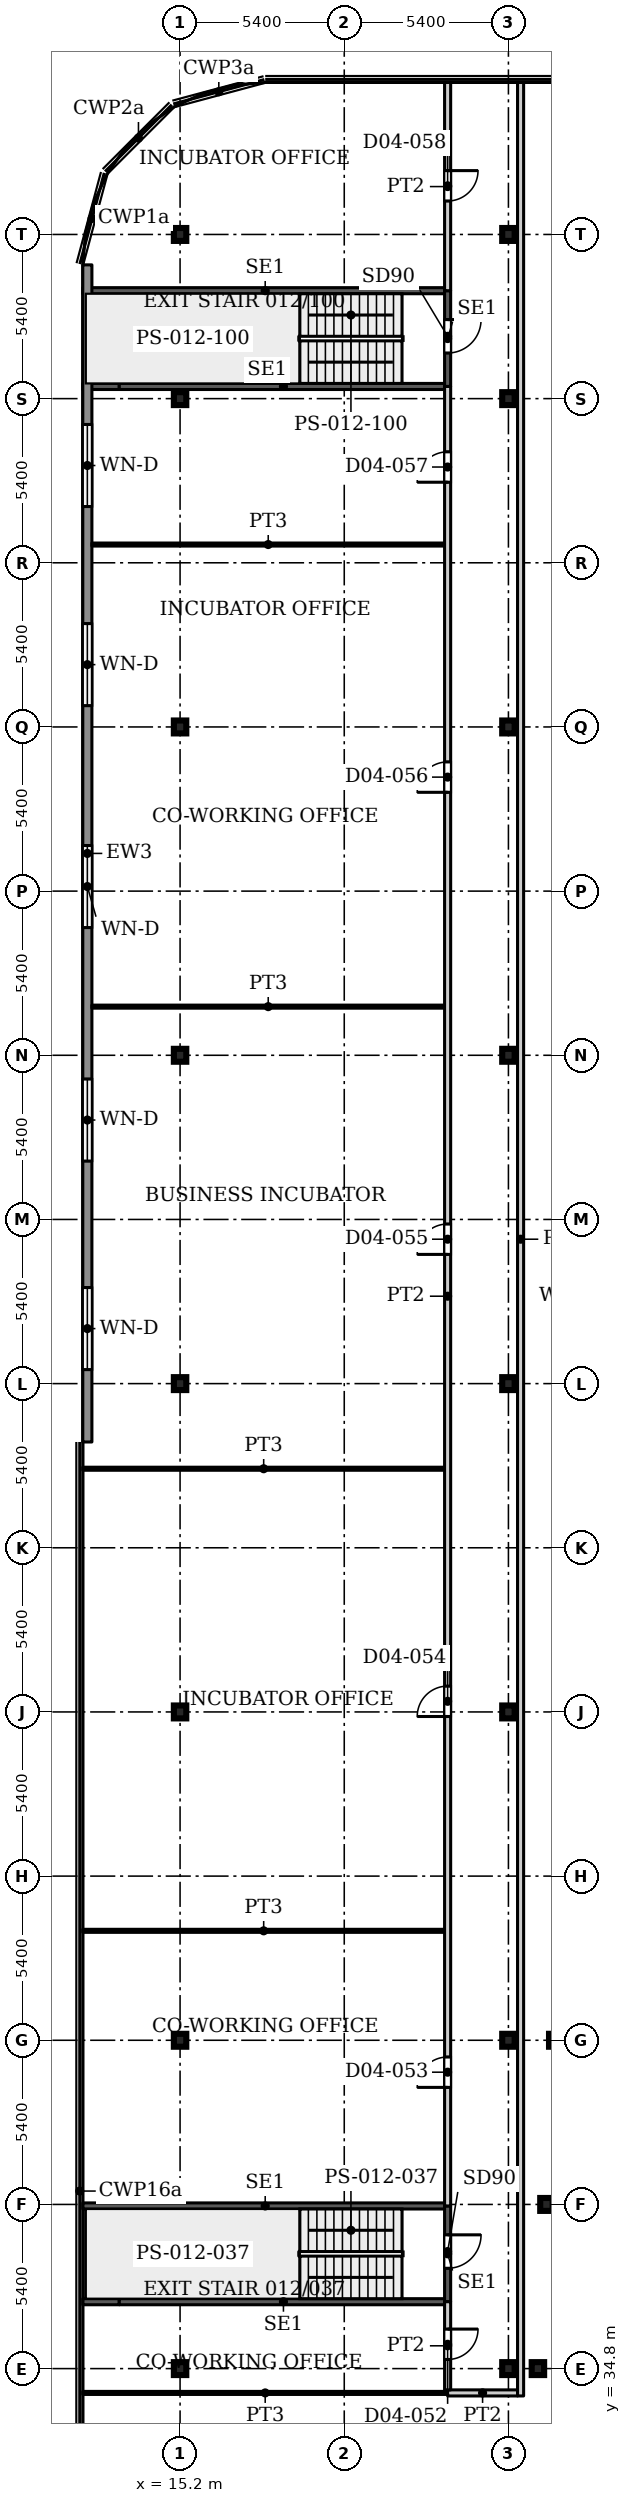
"""IFC4 building model, lengths in metres.
Left out: names, types, materials, properties, quantities, classifications, styles, units other than length and angle.
Written with IfcOpenShell. Run it as: python <this file> out.ifc"""

import sys

from ifc_helpers import new_model, si_unit, direction, frame, frame_2d, origin, origin_2d, place, context, subcontext, project, spatial, rectangle, i_section, extrude, source, transform, mapped, element, fill, save


model = new_model("IFC4")
c1 = context("Model", 3, precision=1e-05, world=origin(), true_north=direction((0.0, 1.0)))
c2 = subcontext(c1, "Body", "Model", "MODEL_VIEW")
j1 = project(units=[si_unit("LENGTHUNIT", "METRE"), si_unit("PLANEANGLEUNIT", "RADIAN")], contexts=[c1])
p1 = place(None, origin())
s1 = spatial("IfcSite", under=j1, at=p1, CompositionType="ELEMENT")
p2 = place(p1, origin())
s2 = spatial("IfcBuilding", under=s1, at=p2, CompositionType="ELEMENT")
p3 = place(p2, frame((0.0, 0.0, 21.5)))
s3 = spatial("IfcBuildingStorey", under=s2, at=p3, CompositionType="ELEMENT", Elevation=21.5)
for number, where, z_axis, x_axis in (
    (1, (15.2, 34.8, 0.0), (0.0, 0.0, 1.0), (1.0, 0.0, 0.0)),
    (2, (26.0, 34.8, 0.0), (0.0, 0.0, 1.0), (1.0, 0.0, 0.0)),
    (3, (15.2, 45.6, 0.0), (0.0, 0.0, 1.0), (1.0, 0.0, 0.0)),
    (4, (26.0, 45.6, 0.0), (0.0, 0.0, 1.0), (1.0, 0.0, 0.0)),
    (5, (15.2, 56.4, 0.0), (0.0, 0.0, 1.0), (1.0, 0.0, 0.0)),
    (6, (26.0, 56.4, 0.0), (0.0, 0.0, 1.0), (1.0, 0.0, 0.0)),
    (7, (15.2, 67.2, 0.0), (0.0, 0.0, 1.0), (1.0, 0.0, 0.0)),
    (8, (26.0, 67.2, 0.0), (0.0, 0.0, 1.0), (1.0, 0.0, 0.0)),
    (9, (15.2, 78.0, 0.0), (0.0, 0.0, 1.0), (1.0, 0.0, 0.0)),
    (10, (26.0, 78.0, 0.0), (0.0, 0.0, 1.0), (1.0, 0.0, 0.0)),
    (11, (15.2, 88.8, 0.0), (0.0, 0.0, 1.0), (1.0, 0.0, 0.0)),
    (12, (26.0, 88.8, 0.0), (0.0, 0.0, 1.0), (1.0, 0.0, 0.0)),
    (13, (15.2, 99.6, 0.0), (0.0, 0.0, 1.0), (1.0, 0.0, 0.0)),
    (14, (26.0, 99.6, 0.0), (0.0, 0.0, 1.0), (1.0, 0.0, 0.0)),
    (15, (15.2, 105.0, 0.0), (0.0, 0.0, 1.0), (1.0, 0.0, 0.0)),
    (16, (26.0, 105.0, 0.0), (0.0, 0.0, 1.0), (1.0, 0.0, 0.0)),
    (17, (26.97, 34.8, 0.0), (0.0, 0.0, 1.0), (1.0, 0.0, 0.0)),
    (18, (27.25, 40.2, 0.0), (0.0, 0.0, 1.0), (1.0, 0.0, 0.0)),
    (19, (27.54, 45.6, 0.0), (0.0, 0.0, 1.0), (1.0, 0.0, 0.0)),
):
    element("IfcColumn", number, at=place(p3, frame(where, z_axis=z_axis, x_axis=x_axis)), inside=s3, PredefinedType="COLUMN", context=c2, shape_type="SweptSolid", body=[
        extrude(i_section(OverallWidth=0.409, OverallDepth=0.425, WebThickness=0.033, FlangeThickness=0.052, FilletRadius=0.013, at=origin_2d()), origin(), (0.0, 0.0, 1.0), 4.5),
    ])
p4 = place(p3, frame((12.15, 65.28, 0.0), z_axis=(0.0, 0.0, 1.0), x_axis=(0.0, 1.0, 0.0)))
e20 = element("IfcWall", 20, at=p4, inside=s3, PredefinedType="SOLIDWALL", context=c2, shape_type="SweptSolid", body=[
    extrude(rectangle(XDim=38.72, YDim=0.3, at=frame_2d((19.36, 0.0))), origin(), (0.0, 0.0, 1.0), 4.25),
])
p5 = place(p4, frame((2.38, 0.0, 0.9)))
e21 = element("IfcOpeningElement", 21, at=p5, cuts=e20, PredefinedType="OPENING", context=c2, shape_type="SweptSolid", body=[
    extrude(rectangle(XDim=2.7, YDim=2.1, at=frame_2d((1.35, 1.05))), frame((0.0, 0.16, 0.0), z_axis=(0.0, -1.0, 0.0), x_axis=(1.0, 0.0, 0.0)), (0.0, 0.0, 1.0), 0.32),
])
p6 = place(p4, frame((9.24, 0.0, 0.9)))
e22 = element("IfcOpeningElement", 22, at=p6, cuts=e20, PredefinedType="OPENING", context=c2, shape_type="SweptSolid", body=[
    extrude(rectangle(XDim=2.7, YDim=2.1, at=frame_2d((1.35, 1.05))), frame((0.0, 0.16, 0.0), z_axis=(0.0, -1.0, 0.0), x_axis=(1.0, 0.0, 0.0)), (0.0, 0.0, 1.0), 0.32),
])
p7 = place(p4, frame((16.92, 0.0, 0.9)))
e23 = element("IfcOpeningElement", 23, at=p7, cuts=e20, PredefinedType="OPENING", context=c2, shape_type="SweptSolid", body=[
    extrude(rectangle(XDim=2.7, YDim=2.1, at=frame_2d((1.35, 1.05))), frame((0.0, 0.16, 0.0), z_axis=(0.0, -1.0, 0.0), x_axis=(1.0, 0.0, 0.0)), (0.0, 0.0, 1.0), 0.32),
])
p8 = place(p4, frame((24.22, 0.0, 0.9)))
e24 = element("IfcOpeningElement", 24, at=p8, cuts=e20, PredefinedType="OPENING", context=c2, shape_type="SweptSolid", body=[
    extrude(rectangle(XDim=2.7, YDim=2.1, at=frame_2d((1.35, 1.05))), frame((0.0, 0.16, 0.0), z_axis=(0.0, -1.0, 0.0), x_axis=(1.0, 0.0, 0.0)), (0.0, 0.0, 1.0), 0.32),
])
p9 = place(p4, frame((30.77, 0.0, 0.9)))
e25 = element("IfcOpeningElement", 25, at=p9, cuts=e20, PredefinedType="OPENING", context=c2, shape_type="SweptSolid", body=[
    extrude(rectangle(XDim=2.7, YDim=2.1, at=frame_2d((1.35, 1.05))), frame((0.0, 0.16, 0.0), z_axis=(0.0, -1.0, 0.0), x_axis=(1.0, 0.0, 0.0)), (0.0, 0.0, 1.0), 0.32),
])
p10 = place(p3, frame((12.0, 37.0, 0.0), z_axis=(0.0, 0.0, 1.0), x_axis=(1.0, 0.0, 0.0)))
e26 = element("IfcWall", 26, at=p10, inside=s3, PredefinedType="SHEAR", context=c2, shape_type="SweptSolid", body=[
    extrude(rectangle(XDim=1.2, YDim=0.2, at=frame_2d((0.6, 0.0))), origin(), (0.0, 0.0, 1.0), 4.5),
])
p11 = place(p3, frame((13.2, 37.0, 0.0), z_axis=(0.0, 0.0, 1.0), x_axis=(1.0, 0.0, 0.0)))
e27 = element("IfcWall", 27, at=p11, inside=s3, PredefinedType="SHEAR", context=c2, shape_type="SweptSolid", body=[
    extrude(rectangle(XDim=10.8, YDim=0.2, at=frame_2d((5.4, 0.0))), origin(), (0.0, 0.0, 1.0), 4.5),
])
p12 = place(p3, frame((12.0, 40.15, 0.0), z_axis=(0.0, 0.0, 1.0), x_axis=(1.0, 0.0, 0.0)))
e28 = element("IfcWall", 28, at=p12, inside=s3, PredefinedType="SHEAR", context=c2, shape_type="SweptSolid", body=[
    extrude(rectangle(XDim=12.0, YDim=0.2, at=frame_2d((6.0, 0.0))), origin(), (0.0, 0.0, 1.0), 4.5),
])
p13 = place(p3, frame((24.0, 37.0, 0.0), z_axis=(0.0, 0.0, 1.0), x_axis=(0.0, 1.0, 0.0)))
e29 = element("IfcWall", 29, at=p13, inside=s3, PredefinedType="SHEAR", context=c2, shape_type="SweptSolid", body=[
    extrude(rectangle(XDim=3.15, YDim=0.2, at=frame_2d((1.575, 0.0))), origin(), (0.0, 0.0, 1.0), 4.5),
])
p14 = place(p13, frame((1.1, 0.0, 0.0)))
e30 = element("IfcOpeningElement", 30, at=p14, cuts=e29, PredefinedType="OPENING", context=c2, shape_type="SweptSolid", body=[
    extrude(rectangle(XDim=1.1, YDim=2.2, at=frame_2d((0.55, 1.1))), frame((0.0, 0.11, 0.0), z_axis=(0.0, -1.0, 0.0), x_axis=(1.0, 0.0, 0.0)), (0.0, 0.0, 1.0), 0.22),
])
p15 = place(p3, frame((12.0, 100.0, 0.0), z_axis=(0.0, 0.0, 1.0), x_axis=(1.0, 0.0, 0.0)))
e31 = element("IfcWall", 31, at=p15, inside=s3, PredefinedType="SHEAR", context=c2, shape_type="SweptSolid", body=[
    extrude(rectangle(XDim=1.2, YDim=0.2, at=frame_2d((0.6, 0.0))), origin(), (0.0, 0.0, 1.0), 4.5),
])
p16 = place(p3, frame((13.2, 100.0, 0.0), z_axis=(0.0, 0.0, 1.0), x_axis=(1.0, 0.0, 0.0)))
e32 = element("IfcWall", 32, at=p16, inside=s3, PredefinedType="SHEAR", context=c2, shape_type="SweptSolid", body=[
    extrude(rectangle(XDim=10.8, YDim=0.2, at=frame_2d((5.4, 0.0))), origin(), (0.0, 0.0, 1.0), 4.5),
])
p17 = place(p3, frame((12.0, 103.15, 0.0), z_axis=(0.0, 0.0, 1.0), x_axis=(1.0, 0.0, 0.0)))
e33 = element("IfcWall", 33, at=p17, inside=s3, PredefinedType="SHEAR", context=c2, shape_type="SweptSolid", body=[
    extrude(rectangle(XDim=12.0, YDim=0.2, at=frame_2d((6.0, 0.0))), origin(), (0.0, 0.0, 1.0), 4.5),
])
p18 = place(p3, frame((24.0, 100.0, 0.0), z_axis=(0.0, 0.0, 1.0), x_axis=(0.0, 1.0, 0.0)))
e34 = element("IfcWall", 34, at=p18, inside=s3, PredefinedType="SHEAR", context=c2, shape_type="SweptSolid", body=[
    extrude(rectangle(XDim=3.15, YDim=0.2, at=frame_2d((1.575, 0.0))), origin(), (0.0, 0.0, 1.0), 4.5),
])
p19 = place(p18, frame((1.1, 0.0, 0.0)))
e35 = element("IfcOpeningElement", 35, at=p19, cuts=e34, PredefinedType="OPENING", context=c2, shape_type="SweptSolid", body=[
    extrude(rectangle(XDim=1.1, YDim=2.2, at=frame_2d((0.55, 1.1))), frame((0.0, 0.11, 0.0), z_axis=(0.0, -1.0, 0.0), x_axis=(1.0, 0.0, 0.0)), (0.0, 0.0, 1.0), 0.22),
])
p20 = place(p3, frame((12.0, 34.0, 0.0), z_axis=(0.0, 0.0, 1.0), x_axis=(1.0, 0.0, 0.0)))
e36 = element("IfcWall", 36, at=p20, inside=s3, PredefinedType="PARTITIONING", context=c2, shape_type="SweptSolid", body=[
    extrude(rectangle(XDim=12.0, YDim=0.1, at=frame_2d((6.0, 0.0))), origin(), (0.0, 0.0, 1.0), 4.18),
])
for number, where, z_axis, x_axis in (
    (37, (12.0, 49.2, 0.0), (0.0, 0.0, 1.0), (1.0, 0.0, 0.0)),
    (38, (12.0, 64.4, 0.0), (0.0, 0.0, 1.0), (1.0, 0.0, 0.0)),
):
    element("IfcWall", number, at=place(p3, frame(where, z_axis=z_axis, x_axis=x_axis)), inside=s3, PredefinedType="PARTITIONING", context=c2, shape_type="SweptSolid", body=[
        extrude(rectangle(XDim=11.9, YDim=0.1, at=frame_2d((5.95, 0.0))), origin(), (0.0, 0.0, 1.0), 4.18),
    ])
for number, where, z_axis, x_axis in (
    (39, (12.299, 79.6, 0.0), (0.0, 0.0, 1.0), (1.0, 0.0, 0.0)),
    (40, (12.299, 94.8, 0.0), (0.0, 0.0, 1.0), (1.0, 0.0, 0.0)),
):
    element("IfcWall", number, at=place(p3, frame(where, z_axis=z_axis, x_axis=x_axis)), inside=s3, PredefinedType="PARTITIONING", context=c2, shape_type="SweptSolid", body=[
        extrude(rectangle(XDim=11.601, YDim=0.1, at=frame_2d((5.8, 0.0))), origin(), (0.0, 0.0, 1.0), 4.18),
    ])
p21 = place(p3, frame((24.0, 34.0, 0.0), z_axis=(0.0, 0.0, 1.0), x_axis=(1.0, 0.0, 0.0)))
e41 = element("IfcWall", 41, at=p21, inside=s3, PredefinedType="PARTITIONING", context=c2, shape_type="SweptSolid", body=[
    extrude(rectangle(XDim=2.3, YDim=0.2, at=frame_2d((1.15, 0.0))), origin(), (0.0, 0.0, 1.0), 4.18),
])
p22 = place(p3, frame((24.0, 34.1, 0.0), z_axis=(0.0, 0.0, 1.0), x_axis=(0.0, 1.0, 0.0)))
e42 = element("IfcWall", 42, at=p22, inside=s3, PredefinedType="PARTITIONING", context=c2, shape_type="SweptSolid", body=[
    extrude(rectangle(XDim=2.9, YDim=0.2, at=frame_2d((1.45, 0.0))), origin(), (0.0, 0.0, 1.0), 4.18),
])
p23 = place(p22, frame((1.0, 0.0, 0.0)))
e43 = element("IfcOpeningElement", 43, at=p23, cuts=e42, PredefinedType="OPENING", context=c2, shape_type="SweptSolid", body=[
    extrude(rectangle(XDim=1.0, YDim=2.1, at=frame_2d((0.5, 1.05))), frame((0.0, 0.11, 0.0), z_axis=(0.0, -1.0, 0.0), x_axis=(1.0, 0.0, 0.0)), (0.0, 0.0, 1.0), 0.22),
])
p24 = place(p3, frame((24.0, 40.15, 0.0), z_axis=(0.0, 0.0, 1.0), x_axis=(0.0, 1.0, 0.0)))
e44 = element("IfcWall", 44, at=p24, inside=s3, PredefinedType="PARTITIONING", context=c2, shape_type="SweptSolid", body=[
    extrude(rectangle(XDim=59.85, YDim=0.2, at=frame_2d((29.925, 0.0))), origin(), (0.0, 0.0, 1.0), 4.18),
])
p25 = place(p24, frame((3.9, 0.0, 0.0)))
e45 = element("IfcOpeningElement", 45, at=p25, cuts=e44, PredefinedType="OPENING", context=c2, shape_type="SweptSolid", body=[
    extrude(rectangle(XDim=1.0, YDim=2.1, at=frame_2d((0.5, 1.05))), frame((0.0, 0.11, 0.0), z_axis=(0.0, -1.0, 0.0), x_axis=(1.0, 0.0, 0.0)), (0.0, 0.0, 1.0), 0.22),
])
p26 = place(p24, frame((16.1, 0.0, 0.0)))
e46 = element("IfcOpeningElement", 46, at=p26, cuts=e44, PredefinedType="OPENING", context=c2, shape_type="SweptSolid", body=[
    extrude(rectangle(XDim=1.0, YDim=2.1, at=frame_2d((0.5, 1.05))), frame((0.0, 0.11, 0.0), z_axis=(0.0, -1.0, 0.0), x_axis=(1.0, 0.0, 0.0)), (0.0, 0.0, 1.0), 0.22),
])
p27 = place(p24, frame((31.3, 0.0, 0.0)))
e47 = element("IfcOpeningElement", 47, at=p27, cuts=e44, PredefinedType="OPENING", context=c2, shape_type="SweptSolid", body=[
    extrude(rectangle(XDim=1.0, YDim=2.1, at=frame_2d((0.5, 1.05))), frame((0.0, 0.11, 0.0), z_axis=(0.0, -1.0, 0.0), x_axis=(1.0, 0.0, 0.0)), (0.0, 0.0, 1.0), 0.22),
])
p28 = place(p24, frame((46.5, 0.0, 0.0)))
e48 = element("IfcOpeningElement", 48, at=p28, cuts=e44, PredefinedType="OPENING", context=c2, shape_type="SweptSolid", body=[
    extrude(rectangle(XDim=1.0, YDim=2.1, at=frame_2d((0.5, 1.05))), frame((0.0, 0.11, 0.0), z_axis=(0.0, -1.0, 0.0), x_axis=(1.0, 0.0, 0.0)), (0.0, 0.0, 1.0), 0.22),
])
p29 = place(p24, frame((56.7, 0.0, 0.0)))
e49 = element("IfcOpeningElement", 49, at=p29, cuts=e44, PredefinedType="OPENING", context=c2, shape_type="SweptSolid", body=[
    extrude(rectangle(XDim=1.0, YDim=2.1, at=frame_2d((0.5, 1.05))), frame((0.0, 0.11, 0.0), z_axis=(0.0, -1.0, 0.0), x_axis=(1.0, 0.0, 0.0)), (0.0, 0.0, 1.0), 0.22),
])
p30 = place(p3, frame((24.0, 103.15, 0.0), z_axis=(0.0, 0.0, 1.0), x_axis=(0.0, 1.0, 0.0)))
e50 = element("IfcWall", 50, at=p30, inside=s3, PredefinedType="PARTITIONING", context=c2, shape_type="SweptSolid", body=[
    extrude(rectangle(XDim=6.85, YDim=0.2, at=frame_2d((3.425, 0.0))), origin(), (0.0, 0.0, 1.0), 4.18),
])
p31 = place(p30, frame((2.95, 0.0, 0.0)))
e51 = element("IfcOpeningElement", 51, at=p31, cuts=e50, PredefinedType="OPENING", context=c2, shape_type="SweptSolid", body=[
    extrude(rectangle(XDim=1.0, YDim=2.1, at=frame_2d((0.5, 1.05))), frame((0.0, 0.11, 0.0), z_axis=(0.0, -1.0, 0.0), x_axis=(1.0, 0.0, 0.0)), (0.0, 0.0, 1.0), 0.22),
])
p32 = place(p3, frame((26.4, 33.9, 0.0), z_axis=(0.0, 0.0, 1.0), x_axis=(0.0, 1.0, 0.0)))
e52 = element("IfcWall", 52, at=p32, inside=s3, PredefinedType="PARTITIONING", context=c2, shape_type="SweptSolid", body=[
    extrude(rectangle(XDim=76.1, YDim=0.2, at=frame_2d((38.05, 0.0))), origin(), (0.0, 0.0, 1.0), 4.18),
])
m1 = source(origin(), c2, "Body", "SweptSolid", [
    extrude(rectangle(XDim=2.7, YDim=2.1, at=frame_2d((1.35, 1.05))), frame((0.0, 0.03, 0.0), z_axis=(0.0, -1.0, 0.0), x_axis=(1.0, 0.0, 0.0)), (0.0, 0.0, 1.0), 0.06),
])
p33 = place(p5, origin())
e53 = element("IfcWindow", 53, at=p33, inside=s3, PartitioningType="SINGLE_PANEL", PredefinedType="WINDOW", context=c2, shape_type="MappedRepresentation", body=[
    mapped(m1, transform((0.0, 0.0, 0.0), x_axis=(1.0, 0.0, 0.0), y_axis=(0.0, 1.0, 0.0), z_axis=(0.0, 0.0, 1.0), scale=1.0)),
])
fill(e21, e53)
p34 = place(p6, origin())
e54 = element("IfcWindow", 54, at=p34, inside=s3, PartitioningType="SINGLE_PANEL", PredefinedType="WINDOW", context=c2, shape_type="MappedRepresentation", body=[
    mapped(m1, transform((0.0, 0.0, 0.0), x_axis=(1.0, 0.0, 0.0), y_axis=(0.0, 1.0, 0.0), z_axis=(0.0, 0.0, 1.0), scale=1.0)),
])
fill(e22, e54)
p35 = place(p7, origin())
e55 = element("IfcWindow", 55, at=p35, inside=s3, PartitioningType="SINGLE_PANEL", PredefinedType="WINDOW", context=c2, shape_type="MappedRepresentation", body=[
    mapped(m1, transform((0.0, 0.0, 0.0), x_axis=(1.0, 0.0, 0.0), y_axis=(0.0, 1.0, 0.0), z_axis=(0.0, 0.0, 1.0), scale=1.0)),
])
fill(e23, e55)
p36 = place(p8, origin())
e56 = element("IfcWindow", 56, at=p36, inside=s3, PartitioningType="SINGLE_PANEL", PredefinedType="WINDOW", context=c2, shape_type="MappedRepresentation", body=[
    mapped(m1, transform((0.0, 0.0, 0.0), x_axis=(1.0, 0.0, 0.0), y_axis=(0.0, 1.0, 0.0), z_axis=(0.0, 0.0, 1.0), scale=1.0)),
])
fill(e24, e56)
p37 = place(p9, origin())
e57 = element("IfcWindow", 57, at=p37, inside=s3, PartitioningType="SINGLE_PANEL", PredefinedType="WINDOW", context=c2, shape_type="MappedRepresentation", body=[
    mapped(m1, transform((0.0, 0.0, 0.0), x_axis=(1.0, 0.0, 0.0), y_axis=(0.0, 1.0, 0.0), z_axis=(0.0, 0.0, 1.0), scale=1.0)),
])
fill(e25, e57)
m2 = source(origin(), c2, "Body", "SweptSolid", [
    extrude(rectangle(XDim=1.1, YDim=2.2, at=frame_2d((0.55, 1.1))), frame((0.0, 0.025, 0.0), z_axis=(0.0, -1.0, 0.0), x_axis=(1.0, 0.0, 0.0)), (0.0, 0.0, 1.0), 0.05),
])
p38 = place(p14, origin())
e58 = element("IfcDoor", 58, at=p38, inside=s3, OperationType="SINGLE_SWING_RIGHT", PredefinedType="DOOR", context=c2, shape_type="MappedRepresentation", body=[
    mapped(m2, transform((0.0, 0.0, 0.0), x_axis=(1.0, 0.0, 0.0), y_axis=(0.0, 1.0, 0.0), z_axis=(0.0, 0.0, 1.0), scale=1.0)),
])
fill(e30, e58)
p39 = place(p19, origin())
e59 = element("IfcDoor", 59, at=p39, inside=s3, OperationType="SINGLE_SWING_RIGHT", PredefinedType="DOOR", context=c2, shape_type="MappedRepresentation", body=[
    mapped(m2, transform((0.0, 0.0, 0.0), x_axis=(1.0, 0.0, 0.0), y_axis=(0.0, 1.0, 0.0), z_axis=(0.0, 0.0, 1.0), scale=1.0)),
])
fill(e35, e59)
m3 = source(origin(), c2, "Body", "SweptSolid", [
    extrude(rectangle(XDim=1.0, YDim=2.1, at=frame_2d((0.5, 1.05))), frame((0.0, 0.025, 0.0), z_axis=(0.0, -1.0, 0.0), x_axis=(1.0, 0.0, 0.0)), (0.0, 0.0, 1.0), 0.05),
])
p40 = place(p23, origin())
e60 = element("IfcDoor", 60, at=p40, inside=s3, OperationType="SINGLE_SWING_RIGHT", PredefinedType="DOOR", context=c2, shape_type="MappedRepresentation", body=[
    mapped(m3, transform((0.0, 0.0, 0.0), x_axis=(1.0, 0.0, 0.0), y_axis=(0.0, 1.0, 0.0), z_axis=(0.0, 0.0, 1.0), scale=1.0)),
])
fill(e43, e60)
p41 = place(p25, origin())
e61 = element("IfcDoor", 61, at=p41, inside=s3, OperationType="SINGLE_SWING_LEFT", PredefinedType="DOOR", context=c2, shape_type="MappedRepresentation", body=[
    mapped(m3, transform((0.0, 0.0, 0.0), x_axis=(1.0, 0.0, 0.0), y_axis=(0.0, 1.0, 0.0), z_axis=(0.0, 0.0, 1.0), scale=1.0)),
])
fill(e45, e61)
p42 = place(p26, origin())
e62 = element("IfcDoor", 62, at=p42, inside=s3, OperationType="SINGLE_SWING_LEFT", PredefinedType="DOOR", context=c2, shape_type="MappedRepresentation", body=[
    mapped(m3, transform((0.0, 0.0, 0.0), x_axis=(1.0, 0.0, 0.0), y_axis=(0.0, 1.0, 0.0), z_axis=(0.0, 0.0, 1.0), scale=1.0)),
])
fill(e46, e62)
p43 = place(p27, origin())
e63 = element("IfcDoor", 63, at=p43, inside=s3, OperationType="SINGLE_SWING_LEFT", PredefinedType="DOOR", context=c2, shape_type="MappedRepresentation", body=[
    mapped(m3, transform((0.0, 0.0, 0.0), x_axis=(1.0, 0.0, 0.0), y_axis=(0.0, 1.0, 0.0), z_axis=(0.0, 0.0, 1.0), scale=1.0)),
])
fill(e47, e63)
p44 = place(p28, origin())
e64 = element("IfcDoor", 64, at=p44, inside=s3, OperationType="SINGLE_SWING_LEFT", PredefinedType="DOOR", context=c2, shape_type="MappedRepresentation", body=[
    mapped(m3, transform((0.0, 0.0, 0.0), x_axis=(1.0, 0.0, 0.0), y_axis=(0.0, 1.0, 0.0), z_axis=(0.0, 0.0, 1.0), scale=1.0)),
])
fill(e48, e64)
p45 = place(p29, origin())
e65 = element("IfcDoor", 65, at=p45, inside=s3, OperationType="SINGLE_SWING_LEFT", PredefinedType="DOOR", context=c2, shape_type="MappedRepresentation", body=[
    mapped(m3, transform((0.0, 0.0, 0.0), x_axis=(1.0, 0.0, 0.0), y_axis=(0.0, 1.0, 0.0), z_axis=(0.0, 0.0, 1.0), scale=1.0)),
])
fill(e49, e65)
p46 = place(p31, origin())
e66 = element("IfcDoor", 66, at=p46, inside=s3, OperationType="SINGLE_SWING_RIGHT", PredefinedType="DOOR", context=c2, shape_type="MappedRepresentation", body=[
    mapped(m3, transform((0.0, 0.0, 0.0), x_axis=(1.0, 0.0, 0.0), y_axis=(0.0, 1.0, 0.0), z_axis=(0.0, 0.0, 1.0), scale=1.0)),
])
fill(e51, e66)
save(model, sys.argv[1])
